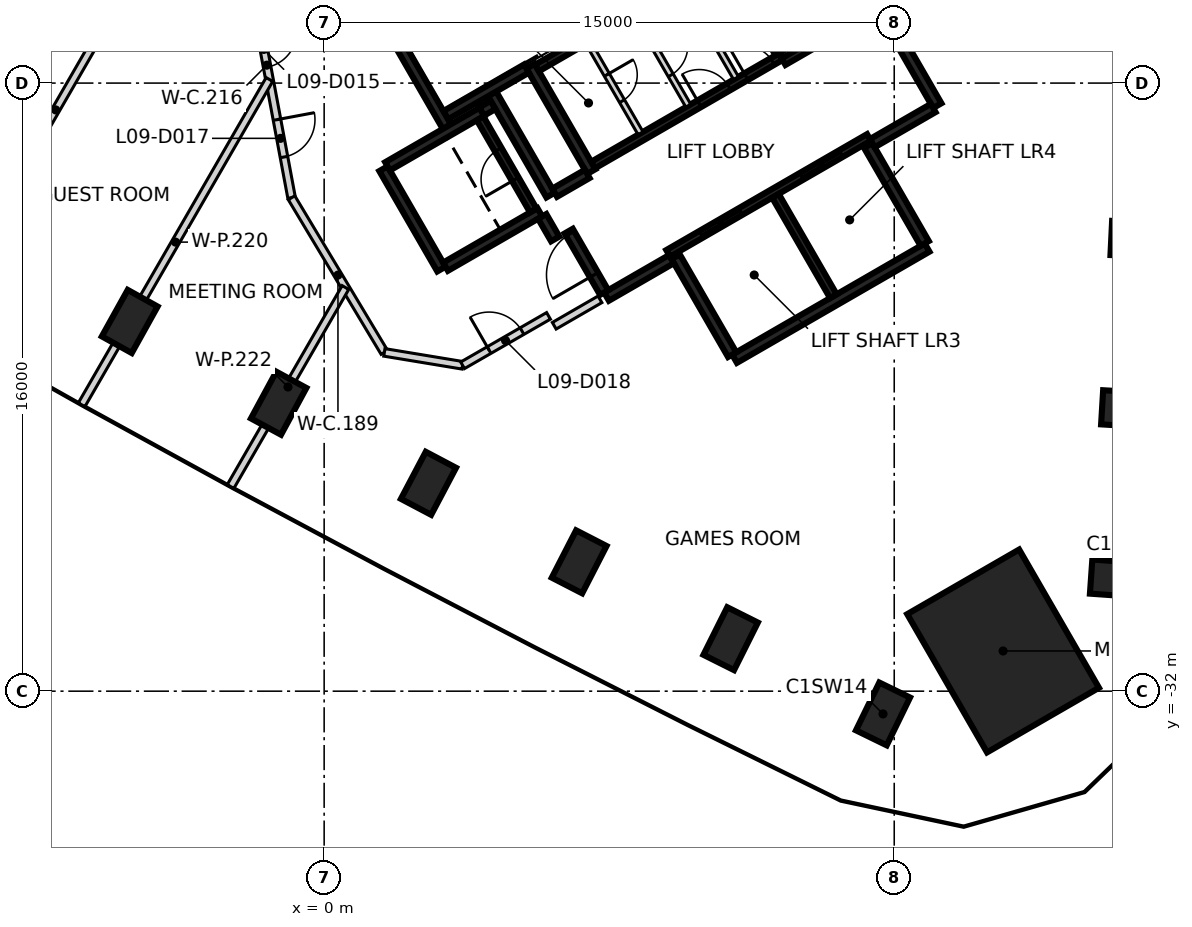
"""IFC4 building model, lengths in metres.
Left out: names, types, materials, properties, quantities, classifications, styles, units other than length and angle.
Written with IfcOpenShell. Run it as: python <this file> out.ifc"""

import sys

from ifc_helpers import new_model, si_unit, direction, frame, frame_2d, origin, origin_2d, place, context, subcontext, project, spatial, rectangle, extrude, element, fill, save


model = new_model("IFC4")
c1 = context("Model", 3, precision=1e-05, world=origin(), true_north=direction((0.0, 1.0)))
c2 = subcontext(c1, "Body", "Model", "MODEL_VIEW")
j1 = project(units=[si_unit("LENGTHUNIT", "METRE"), si_unit("PLANEANGLEUNIT", "RADIAN")], contexts=[c1])
p1 = place(None, origin())
s1 = spatial("IfcSite", under=j1, at=p1, CompositionType="ELEMENT")
p2 = place(p1, origin())
s2 = spatial("IfcBuilding", under=s1, at=p2, CompositionType="ELEMENT")
p3 = place(p2, frame((0.0, 0.0, 45.8)))
s3 = spatial("IfcBuildingStorey", under=s2, at=p3, CompositionType="ELEMENT", Elevation=45.8)
for number, where, z_axis, x_axis in (
    (1, (20.879, -29.034, -0.475), (0.0, 0.0, 1.0), (-0.998, 0.07, 0.0)),
    (2, (21.169, -24.573, -0.475), (0.0, 0.0, 1.0), (-0.998, 0.06, 0.0)),
    (3, (21.41, -20.109, -0.475), (0.0, 0.0, 1.0), (-0.999, 0.048, 0.0)),
    (4, (-5.116, -22.272, -0.475), (0.0, 0.0, 1.0), (0.486, 0.874, 0.0)),
    (5, (-1.197, -24.423, -0.475), (0.0, 0.0, 1.0), (0.476, 0.879, 0.0)),
    (6, (2.745, -26.531, -0.475), (0.0, 0.0, 1.0), (0.467, 0.884, 0.0)),
    (7, (6.71, -28.596, -0.475), (0.0, 0.0, 1.0), (0.458, 0.889, 0.0)),
    (8, (10.696, -30.619, -0.475), (0.0, 0.0, 1.0), (0.447, 0.894, 0.0)),
    (9, (14.705, -32.599, -0.475), (0.0, 0.0, 1.0), (0.438, 0.899, 0.0)),
):
    element("IfcColumn", number, at=place(p3, frame(where, z_axis=z_axis, x_axis=x_axis)), inside=s3, PredefinedType="COLUMN", context=c2, shape_type="SweptSolid", body=[
        extrude(rectangle(XDim=1.4, YDim=0.9, at=origin_2d()), origin(), (0.0, 0.0, 1.0), 3.6),
    ])
p4 = place(p3, frame((17.865, -30.942, -0.475), z_axis=(0.0, 0.0, 1.0), x_axis=(-0.5, 0.866025403784, 0.0)))
e10 = element("IfcColumn", 10, at=p4, inside=s3, PredefinedType="COLUMN", context=c2, shape_type="SweptSolid", body=[
    extrude(rectangle(XDim=4.2, YDim=3.4, at=origin_2d()), origin(), (0.0, 0.0, 1.0), 3.6),
])
p5 = place(p3, frame((13.008, -11.181, 0.0), z_axis=(0.0, 0.0, 1.0), x_axis=(0.500004234368, -0.866022959057, 0.0)))
e11 = element("IfcWall", 11, at=p5, inside=s3, PredefinedType="SHEAR", context=c2, shape_type="SweptSolid", body=[
    extrude(rectangle(XDim=6.25, YDim=0.25, at=frame_2d((3.125, 0.0))), origin(), (0.0, 0.0, 1.0), 3.125),
])
p6 = place(p3, frame((15.865, -20.328, 0.0), z_axis=(0.0, 0.0, 1.0), x_axis=(-0.86602852612, -0.499994591916, 0.0)))
e12 = element("IfcWall", 12, at=p6, inside=s3, PredefinedType="SHEAR", context=c2, shape_type="SweptSolid", body=[
    extrude(rectangle(XDim=5.85, YDim=0.25, at=frame_2d((2.925, 0.0))), origin(), (0.0, 0.0, 1.0), 3.125),
])
p7 = place(p3, frame((3.235, -17.153, 0.0), z_axis=(0.0, 0.0, 1.0), x_axis=(-0.500008851346, 0.866020293397, 0.0)))
e13 = element("IfcWall", 13, at=p7, inside=s3, PredefinedType="SHEAR", context=c2, shape_type="SweptSolid", body=[
    extrude(rectangle(XDim=5.51, YDim=0.25, at=frame_2d((2.755, 0.0))), origin(), (0.0, 0.0, 1.0), 3.125),
])
p8 = place(p3, frame((7.031, -18.327, 0.0), z_axis=(0.0, 0.0, 1.0), x_axis=(-0.499971222258, 0.866042017984, 0.0)))
e14 = element("IfcWall", 14, at=p8, inside=s3, PredefinedType="SHEAR", context=c2, shape_type="SweptSolid", body=[
    extrude(rectangle(XDim=3.2, YDim=0.25, at=frame_2d((1.6, 0.0))), origin(), (0.0, 0.0, 1.0), 3.125),
])
for number, where, z_axis, x_axis in (
    (15, (14.315, -17.644, 0.0), (0.0, 0.0, 1.0), (0.5, -0.866, 0.0)),
    (16, (10.736, -23.145, 0.0), (0.0, 0.0, 1.0), (-0.5, 0.866, 0.0)),
):
    element("IfcWall", number, at=place(p3, frame(where, z_axis=z_axis, x_axis=x_axis)), inside=s3, PredefinedType="SHEAR", context=c2, shape_type="SweptSolid", body=[
        extrude(rectangle(XDim=2.974, YDim=0.25, at=frame_2d((1.487, 0.0))), origin(), (0.0, 0.0, 1.0), 3.125),
    ])
p9 = place(p3, frame((3.085, -20.894, 0.0), z_axis=(0.0, 0.0, 1.0), x_axis=(-0.499978833458, 0.866037623948, 0.0)))
e17 = element("IfcWall", 17, at=p9, inside=s3, PredefinedType="SHEAR", context=c2, shape_type="SweptSolid", body=[
    extrude(rectangle(XDim=3.05, YDim=0.25, at=frame_2d((1.525, 0.0))), origin(), (0.0, 0.0, 1.0), 3.125),
])
p10 = place(p3, frame((1.669, -18.19, 0.0), z_axis=(0.0, 0.0, 1.0), x_axis=(0.866042235819, 0.499970844928, 0.0)))
e18 = element("IfcWall", 18, at=p10, inside=s3, PredefinedType="SHEAR", context=c2, shape_type="SweptSolid", body=[
    extrude(rectangle(XDim=2.865, YDim=0.25, at=frame_2d((1.432, 0.0))), origin(), (0.0, 0.0, 1.0), 3.125),
])
p11 = place(p3, frame((5.675, -19.399, 0.0), z_axis=(0.0, 0.0, 1.0), x_axis=(-0.866026637627, -0.499997862916, 0.0)))
e19 = element("IfcWall", 19, at=p11, inside=s3, PredefinedType="SHEAR", context=c2, shape_type="SweptSolid", body=[
    extrude(rectangle(XDim=2.865, YDim=0.25, at=frame_2d((1.432, 0.0))), origin(), (0.0, 0.0, 1.0), 3.125),
])
p12 = place(p3, frame((4.414, -16.276, 0.0), z_axis=(0.0, 0.0, 1.0), x_axis=(0.500003324108, -0.866023484601, 0.0)))
e20 = element("IfcWall", 20, at=p12, inside=s3, PredefinedType="SHEAR", context=c2, shape_type="SweptSolid", body=[
    extrude(rectangle(XDim=3.085, YDim=0.25, at=frame_2d((1.542, 0.0))), origin(), (0.0, 0.0, 1.0), 3.125),
])
p13 = place(p3, frame((5.322, -15.619, 0.0), z_axis=(0.0, 0.0, 1.0), x_axis=(-0.866026229868, -0.499998569178, 0.0)))
e21 = element("IfcWall", 21, at=p13, inside=s3, PredefinedType="SHEAR", context=c2, shape_type="SweptSolid", body=[
    extrude(rectangle(XDim=2.449, YDim=0.25, at=frame_2d((1.225, 0.0))), origin(), (0.0, 0.0, 1.0), 3.125),
])
p14 = place(p3, frame((9.14, -20.631, 0.0), z_axis=(0.0, 0.0, 1.0), x_axis=(-0.866043531843, -0.499968599967, 0.0)))
e22 = element("IfcWall", 22, at=p14, inside=s3, PredefinedType="SHEAR", context=c2, shape_type="SweptSolid", body=[
    extrude(rectangle(XDim=1.975, YDim=0.25, at=frame_2d((0.987, 0.0))), origin(), (0.0, 0.0, 1.0), 3.125),
])
p15 = place(p3, frame((16.025, -16.656, 0.0), z_axis=(0.0, 0.0, 1.0), x_axis=(-0.866016279763, -0.500015802937, 0.0)))
e23 = element("IfcWall", 23, at=p15, inside=s3, PredefinedType="SHEAR", context=c2, shape_type="SweptSolid", body=[
    extrude(rectangle(XDim=1.849, YDim=0.25, at=frame_2d((0.925, 0.0))), origin(), (0.0, 0.0, 1.0), 3.125),
])
p16 = place(p3, frame((7.367, -21.51, 0.0), z_axis=(0.0, 0.0, 1.0), x_axis=(-0.499983108224, 0.866035156036, 0.0)))
e24 = element("IfcWall", 24, at=p16, inside=s3, PredefinedType="SHEAR", context=c2, shape_type="SweptSolid", body=[
    extrude(rectangle(XDim=1.865, YDim=0.25, at=frame_2d((0.932, 0.0))), origin(), (0.0, 0.0, 1.0), 3.125),
])
p17 = place(p16, frame((0.535, 0.0, 0.0)))
e25 = element("IfcOpeningElement", 25, at=p17, cuts=e24, PredefinedType="OPENING", context=c2, shape_type="SweptSolid", body=[
    extrude(rectangle(XDim=1.25, YDim=2.1, at=frame_2d((0.625, 1.05))), frame((0.0, 0.135, 0.0), z_axis=(0.0, -1.0, 0.0), x_axis=(1.0, 0.0, 0.0)), (0.0, 0.0, 1.0), 0.27),
])
p18 = place(p3, frame((6.065, -18.885, 0.0), z_axis=(0.0, 0.0, 1.0), x_axis=(0.866017078145, 0.500014420154, 0.0)))
e26 = element("IfcWall", 26, at=p18, inside=s3, PredefinedType="SHEAR", context=c2, shape_type="SweptSolid", body=[
    extrude(rectangle(XDim=0.989, YDim=0.25, at=frame_2d((0.495, 0.0))), origin(), (0.0, 0.0, 1.0), 3.125),
])
p19 = place(p3, frame((6.08, -20.1, 0.0), z_axis=(0.0, 0.0, 1.0), x_axis=(-0.500051773299, 0.865995510393, 0.0)))
e27 = element("IfcWall", 27, at=p19, inside=s3, PredefinedType="SHEAR", context=c2, shape_type="SweptSolid", body=[
    extrude(rectangle(XDim=0.685, YDim=0.25, at=frame_2d((0.342, 0.0))), origin(), (0.0, 0.0, 1.0), 3.125),
])
p20 = place(p3, frame((4.145, -16.749, 0.0), z_axis=(0.0, 0.0, 1.0), x_axis=(0.866185586049, 0.49972245349, 0.0)))
e28 = element("IfcWall", 28, at=p20, inside=s3, PredefinedType="SHEAR", context=c2, shape_type="SweptSolid", body=[
    extrude(rectangle(XDim=0.344, YDim=0.25, at=frame_2d((0.172, 0.0))), origin(), (0.0, 0.0, 1.0), 3.125),
])
p21 = place(p3, frame((9.052, -20.48, 0.0), z_axis=(0.0, 0.0, 1.0), x_axis=(0.866030299012, 0.499991521122, 0.0)))
e29 = element("IfcWall", 29, at=p21, inside=s3, PredefinedType="SHEAR", context=c2, shape_type="SweptSolid", body=[
    extrude(rectangle(XDim=6.1, YDim=0.2, at=frame_2d((3.05, 0.0))), origin(), (0.0, 0.0, 1.0), 3.125),
])
p22 = place(p21, frame((1.0, 0.0, 0.0)))
e30 = element("IfcOpeningElement", 30, at=p22, cuts=e29, PredefinedType="OPENING", context=c2, shape_type="SweptSolid", body=[
    extrude(rectangle(XDim=1.2, YDim=2.1, at=frame_2d((0.6, 1.05))), frame((0.0, 0.11, 0.0), z_axis=(0.0, -1.0, 0.0), x_axis=(1.0, 0.0, 0.0)), (0.0, 0.0, 1.0), 0.22),
])
p23 = place(p21, frame((4.05, 0.0, 0.0)))
e31 = element("IfcOpeningElement", 31, at=p23, cuts=e29, PredefinedType="OPENING", context=c2, shape_type="SweptSolid", body=[
    extrude(rectangle(XDim=1.2, YDim=2.1, at=frame_2d((0.6, 1.05))), frame((0.0, 0.11, 0.0), z_axis=(0.0, -1.0, 0.0), x_axis=(1.0, 0.0, 0.0)), (0.0, 0.0, 1.0), 0.22),
])
p24 = place(p3, frame((10.538, -12.752, 0.0), z_axis=(0.0, 0.0, 1.0), x_axis=(-0.866038630372, -0.499977090179, 0.0)))
e32 = element("IfcWall", 32, at=p24, inside=s3, PredefinedType="SHEAR", context=c2, shape_type="SweptSolid", body=[
    extrude(rectangle(XDim=5.699, YDim=0.2, at=frame_2d((2.85, 0.0))), origin(), (0.0, 0.0, 1.0), 3.125),
])
p25 = place(p3, frame((7.077, -18.156, 0.0), z_axis=(0.0, 0.0, 1.0), x_axis=(0.866038630372, 0.499977090179, 0.0)))
e33 = element("IfcWall", 33, at=p25, inside=s3, PredefinedType="SHEAR", context=c2, shape_type="SweptSolid", body=[
    extrude(rectangle(XDim=5.699, YDim=0.2, at=frame_2d((2.85, 0.0))), origin(), (0.0, 0.0, 1.0), 3.125),
])
p26 = place(p25, frame((3.224, 0.0, 0.0)))
e34 = element("IfcOpeningElement", 34, at=p26, cuts=e33, PredefinedType="OPENING", context=c2, shape_type="SweptSolid", body=[
    extrude(rectangle(XDim=0.9, YDim=2.1, at=frame_2d((0.45, 1.05))), frame((0.0, 0.11, 0.0), z_axis=(0.0, -1.0, 0.0), x_axis=(1.0, 0.0, 0.0)), (0.0, 0.0, 1.0), 0.22),
])
p27 = place(p25, frame((4.649, 0.0, 0.0)))
e35 = element("IfcOpeningElement", 35, at=p27, cuts=e33, PredefinedType="OPENING", context=c2, shape_type="SweptSolid", body=[
    extrude(rectangle(XDim=0.8, YDim=2.1, at=frame_2d((0.4, 1.05))), frame((0.0, 0.11, 0.0), z_axis=(0.0, -1.0, 0.0), x_axis=(1.0, 0.0, 0.0)), (0.0, 0.0, 1.0), 0.22),
])
p28 = place(p3, frame((11.875, -18.967, 0.0), z_axis=(0.0, 0.0, 1.0), x_axis=(0.49998131003, -0.866036194175, 0.0)))
e36 = element("IfcWall", 36, at=p28, inside=s3, PredefinedType="SHEAR", context=c2, shape_type="SweptSolid", body=[
    extrude(rectangle(XDim=3.048, YDim=0.2, at=frame_2d((1.524, 0.0))), origin(), (0.0, 0.0, 1.0), 3.125),
])
p29 = place(p3, frame((5.503, -19.352, 0.0), z_axis=(0.0, 0.0, 1.0), x_axis=(-0.499986818241, 0.866033014143, 0.0)))
e37 = element("IfcWall", 37, at=p29, inside=s3, PredefinedType="SHEAR", context=c2, shape_type="SweptSolid", body=[
    extrude(rectangle(XDim=2.798, YDim=0.2, at=frame_2d((1.399, 0.0))), origin(), (0.0, 0.0, 1.0), 3.125),
])
p30 = place(p29, frame((0.949, 0.0, 0.0)))
e38 = element("IfcOpeningElement", 38, at=p30, cuts=e37, PredefinedType="OPENING", context=c2, shape_type="SweptSolid", body=[
    extrude(rectangle(XDim=0.9, YDim=2.1, at=frame_2d((0.45, 1.05))), frame((0.0, 0.11, 0.0), z_axis=(0.0, -1.0, 0.0), x_axis=(1.0, 0.0, 0.0)), (0.0, 0.0, 1.0), 0.22),
])
p31 = place(p3, frame((11.963, -15.22, 0.0), z_axis=(0.0, 0.0, 1.0), x_axis=(-0.500034990121, 0.866005201286, 0.0)))
e39 = element("IfcWall", 39, at=p31, inside=s3, PredefinedType="SHEAR", context=c2, shape_type="SweptSolid", body=[
    extrude(rectangle(XDim=2.75, YDim=0.2, at=frame_2d((1.375, 0.0))), origin(), (0.0, 0.0, 1.0), 3.125),
])
p32 = place(p3, frame((14.512, -14.037, 0.0), z_axis=(0.0, 0.0, 1.0), x_axis=(-0.866044696403, -0.499966582715, 0.0)))
e40 = element("IfcWall", 40, at=p32, inside=s3, PredefinedType="SHEAR", context=c2, shape_type="SweptSolid", body=[
    extrude(rectangle(XDim=2.799, YDim=0.2, at=frame_2d((1.399, 0.0))), origin(), (0.0, 0.0, 1.0), 3.125),
])
p33 = place(p3, frame((8.207, -14.214, 0.0), z_axis=(0.0, 0.0, 1.0), x_axis=(0.50002746344, -0.86600954718, 0.0)))
e41 = element("IfcWall", 41, at=p33, inside=s3, PredefinedType="PARTITIONING", context=c2, shape_type="SweptSolid", body=[
    extrude(rectangle(XDim=2.748, YDim=0.15, at=frame_2d((1.374, 0.0))), origin(), (0.0, 0.0, 1.0), 3.125),
])
p34 = place(p33, frame((0.924, 0.0, 0.0)))
e42 = element("IfcOpeningElement", 42, at=p34, cuts=e41, PredefinedType="OPENING", context=c2, shape_type="SweptSolid", body=[
    extrude(rectangle(XDim=0.9, YDim=2.1, at=frame_2d((0.45, 1.05))), frame((0.0, 0.085, 0.0), z_axis=(0.0, -1.0, 0.0), x_axis=(1.0, 0.0, 0.0)), (0.0, 0.0, 1.0), 0.17),
])
p35 = place(p3, frame((9.462, -13.489, 0.0), z_axis=(0.0, 0.0, 1.0), x_axis=(0.499988999718, -0.866031754707, 0.0)))
e43 = element("IfcWall", 43, at=p35, inside=s3, PredefinedType="PARTITIONING", context=c2, shape_type="SweptSolid", body=[
    extrude(rectangle(XDim=2.749, YDim=0.15, at=frame_2d((1.374, 0.0))), origin(), (0.0, 0.0, 1.0), 3.125),
])
p36 = place(p3, frame((6.951, -14.939, 0.0), z_axis=(0.0, 0.0, 1.0), x_axis=(0.499988999718, -0.866031754707, 0.0)))
e44 = element("IfcWall", 44, at=p36, inside=s3, PredefinedType="PARTITIONING", context=c2, shape_type="SweptSolid", body=[
    extrude(rectangle(XDim=2.749, YDim=0.15, at=frame_2d((1.374, 0.0))), origin(), (0.0, 0.0, 1.0), 3.125),
])
p37 = place(p36, frame((0.974, 0.0, 0.0)))
e45 = element("IfcOpeningElement", 45, at=p37, cuts=e44, PredefinedType="OPENING", context=c2, shape_type="SweptSolid", body=[
    extrude(rectangle(XDim=0.8, YDim=2.1, at=frame_2d((0.4, 1.05))), frame((0.0, 0.085, 0.0), z_axis=(0.0, -1.0, 0.0), x_axis=(1.0, 0.0, 0.0)), (0.0, 0.0, 1.0), 0.17),
])
p38 = place(p3, frame((-2.162, -12.042, 0.0), z_axis=(0.0, 0.0, 1.0), x_axis=(0.183949825522, -0.982935634561, 0.0)))
e46 = element("IfcWall", 46, at=p38, inside=s3, PredefinedType="PARTITIONING", context=c2, shape_type="SweptSolid", body=[
    extrude(rectangle(XDim=7.094, YDim=0.2, at=frame_2d((3.547, 0.0))), origin(), (0.0, 0.0, 1.0), 3.125),
])
p39 = place(p38, frame((2.65, 0.0, 0.0)))
e47 = element("IfcOpeningElement", 47, at=p39, cuts=e46, PredefinedType="OPENING", context=c2, shape_type="SweptSolid", body=[
    extrude(rectangle(XDim=0.95, YDim=2.1, at=frame_2d((0.475, 1.05))), frame((0.0, 0.11, 0.0), z_axis=(0.0, -1.0, 0.0), x_axis=(1.0, 0.0, 0.0)), (0.0, 0.0, 1.0), 0.22),
])
p40 = place(p38, frame((5.006, 0.0, 0.0)))
e48 = element("IfcOpeningElement", 48, at=p40, cuts=e46, PredefinedType="OPENING", context=c2, shape_type="SweptSolid", body=[
    extrude(rectangle(XDim=1.0, YDim=2.1, at=frame_2d((0.5, 1.05))), frame((0.0, 0.11, 0.0), z_axis=(0.0, -1.0, 0.0), x_axis=(1.0, 0.0, 0.0)), (0.0, 0.0, 1.0), 0.22),
])
p41 = place(p3, frame((-0.858, -19.017, 0.0), z_axis=(0.0, 0.0, 1.0), x_axis=(0.514647068805, -0.857402119528, 0.0)))
e49 = element("IfcWall", 49, at=p41, inside=s3, PredefinedType="PARTITIONING", context=c2, shape_type="SweptSolid", body=[
    extrude(rectangle(XDim=4.745, YDim=0.2, at=frame_2d((2.373, 0.0))), origin(), (0.0, 0.0, 1.0), 3.125),
])
p42 = place(p3, frame((1.584, -23.086, 0.0), z_axis=(0.0, 0.0, 1.0), x_axis=(0.986633159246, -0.162957077405, 0.0)))
e50 = element("IfcWall", 50, at=p42, inside=s3, PredefinedType="PARTITIONING", context=c2, shape_type="SweptSolid", body=[
    extrude(rectangle(XDim=2.087, YDim=0.2, at=frame_2d((1.043, 0.0))), origin(), (0.0, 0.0, 1.0), 3.125),
])
p43 = place(p3, frame((3.643, -23.426, 0.0), z_axis=(0.0, 0.0, 1.0), x_axis=(0.866654350985, 0.498909045738, 0.0)))
e51 = element("IfcWall", 51, at=p43, inside=s3, PredefinedType="PARTITIONING", context=c2, shape_type="SweptSolid", body=[
    extrude(rectangle(XDim=2.608, YDim=0.2, at=frame_2d((1.304, 0.0))), origin(), (0.0, 0.0, 1.0), 3.125),
])
p44 = place(p43, frame((0.804, 0.0, 0.0)))
e52 = element("IfcOpeningElement", 52, at=p44, cuts=e51, PredefinedType="OPENING", context=c2, shape_type="SweptSolid", body=[
    extrude(rectangle(XDim=1.0, YDim=2.1, at=frame_2d((0.5, 1.05))), frame((0.0, 0.11, 0.0), z_axis=(0.0, -1.0, 0.0), x_axis=(1.0, 0.0, 0.0)), (0.0, 0.0, 1.0), 0.22),
])
p45 = place(p3, frame((6.054, -22.385, 0.0), z_axis=(0.0, 0.0, 1.0), x_axis=(0.86593101922, 0.500163443238, 0.0)))
e53 = element("IfcWall", 53, at=p45, inside=s3, PredefinedType="PARTITIONING", context=c2, shape_type="SweptSolid", body=[
    extrude(rectangle(XDim=1.39, YDim=0.2, at=frame_2d((0.695, 0.0))), origin(), (0.0, 0.0, 1.0), 3.125),
])
p46 = place(p3, frame((-14.148, -20.035, 0.0), z_axis=(0.0, 0.0, 1.0), x_axis=(0.499978771293, 0.866037659837, 0.0)))
e54 = element("IfcWall", 54, at=p46, inside=s3, PredefinedType="PARTITIONING", context=c2, shape_type="SweptSolid", body=[
    extrude(rectangle(XDim=17.425, YDim=0.2, at=frame_2d((8.712, 0.0))), origin(), (0.0, 0.0, 1.0), 3.125),
])
p47 = place(p3, frame((-10.276, -22.271, 0.0), z_axis=(0.0, 0.0, 1.0), x_axis=(0.499984478165, 0.866034365135, 0.0)))
e55 = element("IfcWall", 55, at=p47, inside=s3, PredefinedType="PARTITIONING", context=c2, shape_type="SweptSolid", body=[
    extrude(rectangle(XDim=12.851, YDim=0.2, at=frame_2d((6.426, 0.0))), origin(), (0.0, 0.0, 1.0), 3.125),
])
p48 = place(p3, frame((-6.381, -24.464, 0.0), z_axis=(0.0, 0.0, 1.0), x_axis=(0.500007577232, 0.866021029023, 0.0)))
e56 = element("IfcWall", 56, at=p48, inside=s3, PredefinedType="PARTITIONING", context=c2, shape_type="SweptSolid", body=[
    extrude(rectangle(XDim=9.883, YDim=0.2, at=frame_2d((4.941, 0.0))), origin(), (0.0, 0.0, 1.0), 3.125),
])
p49 = place(p3, frame((-2.462, -26.615, 0.0), z_axis=(0.0, 0.0, 1.0), x_axis=(0.49992636536, 0.86606791259, 0.0)))
e57 = element("IfcWall", 57, at=p49, inside=s3, PredefinedType="PARTITIONING", context=c2, shape_type="SweptSolid", body=[
    extrude(rectangle(XDim=6.046, YDim=0.2, at=frame_2d((3.023, 0.0))), origin(), (0.0, 0.0, 1.0), 3.125),
])
p50 = place(p22, origin())
e58 = element("IfcDoor", 58, at=p50, inside=s3, OperationType="DOUBLE_DOOR_SLIDING", PredefinedType="DOOR", context=c2, shape_type="SweptSolid", body=[
    extrude(rectangle(XDim=1.2, YDim=2.1, at=frame_2d((0.6, 1.05))), frame((0.0, 0.025, 0.0), z_axis=(0.0, -1.0, 0.0), x_axis=(1.0, 0.0, 0.0)), (0.0, 0.0, 1.0), 0.05),
])
fill(e30, e58)
p51 = place(p23, origin())
e59 = element("IfcDoor", 59, at=p51, inside=s3, OperationType="DOUBLE_DOOR_SLIDING", PredefinedType="DOOR", context=c2, shape_type="SweptSolid", body=[
    extrude(rectangle(XDim=1.2, YDim=2.1, at=frame_2d((0.6, 1.05))), frame((0.0, 0.025, 0.0), z_axis=(0.0, -1.0, 0.0), x_axis=(1.0, 0.0, 0.0)), (0.0, 0.0, 1.0), 0.05),
])
fill(e31, e59)
p52 = place(p17, origin())
e60 = element("IfcDoor", 60, at=p52, inside=s3, OperationType="SINGLE_SWING_LEFT", PredefinedType="DOOR", context=c2, shape_type="SweptSolid", body=[
    extrude(rectangle(XDim=1.25, YDim=2.1, at=frame_2d((0.625, 1.05))), frame((0.0, 0.025, 0.0), z_axis=(0.0, -1.0, 0.0), x_axis=(1.0, 0.0, 0.0)), (0.0, 0.0, 1.0), 0.05),
])
fill(e25, e60)
p53 = place(p26, origin())
e61 = element("IfcDoor", 61, at=p53, inside=s3, OperationType="SINGLE_SWING_RIGHT", PredefinedType="DOOR", context=c2, shape_type="SweptSolid", body=[
    extrude(rectangle(XDim=0.9, YDim=2.1, at=frame_2d((0.45, 1.05))), frame((0.0, 0.025, 0.0), z_axis=(0.0, -1.0, 0.0), x_axis=(1.0, 0.0, 0.0)), (0.0, 0.0, 1.0), 0.05),
])
fill(e34, e61)
p54 = place(p27, origin())
e62 = element("IfcDoor", 62, at=p54, inside=s3, OperationType="SINGLE_SWING_LEFT", PredefinedType="DOOR", context=c2, shape_type="SweptSolid", body=[
    extrude(rectangle(XDim=0.8, YDim=2.1, at=frame_2d((0.4, 1.05))), frame((0.0, 0.025, 0.0), z_axis=(0.0, -1.0, 0.0), x_axis=(1.0, 0.0, 0.0)), (0.0, 0.0, 1.0), 0.05),
])
fill(e35, e62)
p55 = place(p30, origin())
e63 = element("IfcDoor", 63, at=p55, inside=s3, OperationType="SINGLE_SWING_RIGHT", PredefinedType="DOOR", context=c2, shape_type="SweptSolid", body=[
    extrude(rectangle(XDim=0.9, YDim=2.1, at=frame_2d((0.45, 1.05))), frame((0.0, 0.025, 0.0), z_axis=(0.0, -1.0, 0.0), x_axis=(1.0, 0.0, 0.0)), (0.0, 0.0, 1.0), 0.05),
])
fill(e38, e63)
p56 = place(p34, origin())
e64 = element("IfcDoor", 64, at=p56, inside=s3, OperationType="SINGLE_SWING_LEFT", PredefinedType="DOOR", context=c2, shape_type="SweptSolid", body=[
    extrude(rectangle(XDim=0.9, YDim=2.1, at=frame_2d((0.45, 1.05))), frame((0.0, 0.025, 0.0), z_axis=(0.0, -1.0, 0.0), x_axis=(1.0, 0.0, 0.0)), (0.0, 0.0, 1.0), 0.05),
])
fill(e42, e64)
p57 = place(p37, origin())
e65 = element("IfcDoor", 65, at=p57, inside=s3, OperationType="SINGLE_SWING_RIGHT", PredefinedType="DOOR", context=c2, shape_type="SweptSolid", body=[
    extrude(rectangle(XDim=0.8, YDim=2.1, at=frame_2d((0.4, 1.05))), frame((0.0, 0.025, 0.0), z_axis=(0.0, -1.0, 0.0), x_axis=(1.0, 0.0, 0.0)), (0.0, 0.0, 1.0), 0.05),
])
fill(e45, e65)
p58 = place(p39, frame((0.95, 0.0, 0.0), z_axis=(0.0, 0.0, 1.0), x_axis=(-1.0, 0.0, 0.0)))
e66 = element("IfcDoor", 66, at=p58, inside=s3, OperationType="SINGLE_SWING_LEFT", PredefinedType="DOOR", context=c2, shape_type="SweptSolid", body=[
    extrude(rectangle(XDim=0.95, YDim=2.1, at=frame_2d((0.475, 1.05))), frame((0.0, 0.025, 0.0), z_axis=(0.0, -1.0, 0.0), x_axis=(1.0, 0.0, 0.0)), (0.0, 0.0, 1.0), 0.05),
])
fill(e47, e66)
p59 = place(p40, frame((1.0, 0.0, 0.0), z_axis=(0.0, 0.0, 1.0), x_axis=(-1.0, 0.0, 0.0)))
e67 = element("IfcDoor", 67, at=p59, inside=s3, OperationType="SINGLE_SWING_LEFT", PredefinedType="DOOR", context=c2, shape_type="SweptSolid", body=[
    extrude(rectangle(XDim=1.0, YDim=2.1, at=frame_2d((0.5, 1.05))), frame((0.0, 0.025, 0.0), z_axis=(0.0, -1.0, 0.0), x_axis=(1.0, 0.0, 0.0)), (0.0, 0.0, 1.0), 0.05),
])
fill(e48, e67)
p60 = place(p44, frame((1.0, 0.0, 0.0), z_axis=(0.0, 0.0, 1.0), x_axis=(-1.0, 0.0, 0.0)))
e68 = element("IfcDoor", 68, at=p60, inside=s3, OperationType="SINGLE_SWING_LEFT", PredefinedType="DOOR", context=c2, shape_type="SweptSolid", body=[
    extrude(rectangle(XDim=1.0, YDim=2.1, at=frame_2d((0.5, 1.05))), frame((0.0, 0.025, 0.0), z_axis=(0.0, -1.0, 0.0), x_axis=(1.0, 0.0, 0.0)), (0.0, 0.0, 1.0), 0.05),
])
fill(e52, e68)
save(model, sys.argv[1])
